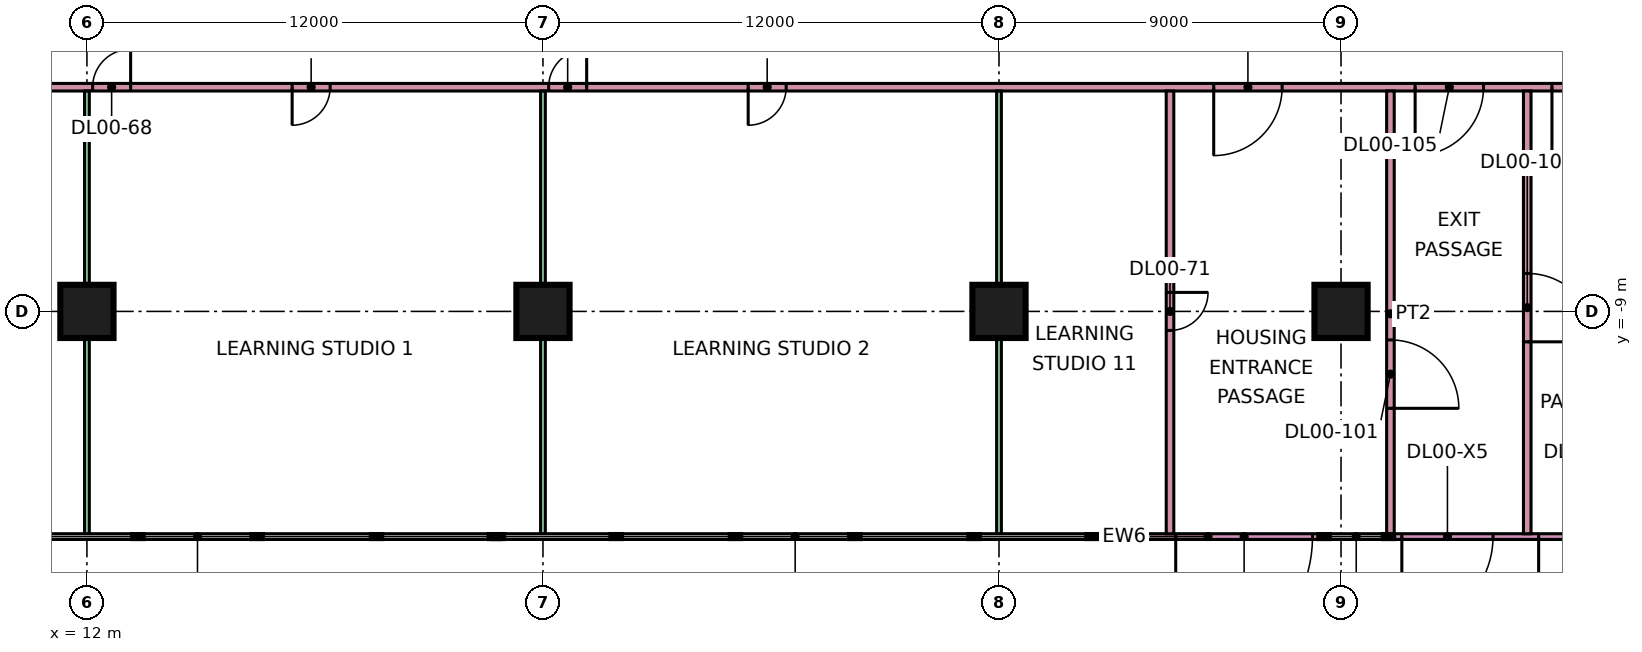
"""IFC4 building model, lengths in metres.
Left out: names, types, materials, properties, quantities, classifications, styles, units other than length and angle.
Written with IfcOpenShell. Run it as: python <this file> out.ifc"""

import sys

from ifc_helpers import new_model, si_unit, direction, frame, frame_2d, origin, origin_2d, place, context, subcontext, project, spatial, rectangle, extrude, element, fill, save


model = new_model("IFC4")
c1 = context("Model", 3, precision=1e-05, world=origin(), true_north=direction((0.0, 1.0)))
c2 = subcontext(c1, "Body", "Model", "MODEL_VIEW")
j1 = project(units=[si_unit("LENGTHUNIT", "METRE"), si_unit("PLANEANGLEUNIT", "RADIAN")], contexts=[c1])
p1 = place(None, origin())
s1 = spatial("IfcSite", under=j1, at=p1, CompositionType="ELEMENT")
p2 = place(p1, origin())
s2 = spatial("IfcBuilding", under=s1, at=p2, CompositionType="ELEMENT")
p3 = place(p2, origin())
s3 = spatial("IfcBuildingStorey", under=s2, at=p3, CompositionType="ELEMENT", Elevation=0.0)
for number, where, z_axis, x_axis in (
    (1, (12.0, -9.0, 0.0), (0.0, 0.0, 1.0), (1.0, 0.0, 0.0)),
    (2, (24.0, -9.0, 0.0), (0.0, 0.0, 1.0), (1.0, 0.0, 0.0)),
    (3, (36.0, -9.0, 0.0), (0.0, 0.0, 1.0), (1.0, 0.0, 0.0)),
    (4, (45.0, -9.0, 0.0), (0.0, 0.0, 1.0), (1.0, 0.0, 0.0)),
):
    element("IfcColumn", number, at=place(p3, frame(where, z_axis=z_axis, x_axis=x_axis)), inside=s3, PredefinedType="COLUMN", context=c2, shape_type="SweptSolid", body=[
        extrude(rectangle(XDim=1.4, YDim=1.4, at=origin_2d()), origin(), (0.0, 0.0, 1.0), 7.2),
    ])
p4 = place(p3, frame((38.5, -14.925, 0.0), z_axis=(0.0, 0.0, 1.0), x_axis=(1.0, 0.0, 0.0)))
e5 = element("IfcWall", 5, at=p4, inside=s3, PredefinedType="SOLIDWALL", context=c2, shape_type="SweptSolid", body=[
    extrude(rectangle(XDim=6.0, YDim=0.15, at=frame_2d((3.0, 0.0))), origin(), (0.0, 0.0, 1.0), 6.8),
])
p5 = place(p4, frame((2.15, 0.0, 0.0)))
e6 = element("IfcOpeningElement", 6, at=p5, cuts=e5, PredefinedType="OPENING", context=c2, shape_type="SweptSolid", body=[
    extrude(rectangle(XDim=3.6, YDim=2.8, at=frame_2d((1.8, 1.4))), frame((0.0, 0.085, 0.0), z_axis=(0.0, -1.0, 0.0), x_axis=(1.0, 0.0, 0.0)), (0.0, 0.0, 1.0), 0.17),
])
p6 = place(p3, frame((46.3, -14.925, 0.0), z_axis=(0.0, 0.0, 1.0), x_axis=(1.0, 0.0, 0.0)))
e7 = element("IfcWall", 7, at=p6, inside=s3, PredefinedType="SOLIDWALL", context=c2, shape_type="SweptSolid", body=[
    extrude(rectangle(XDim=6.6, YDim=0.15, at=frame_2d((3.3, 0.0))), origin(), (0.0, 0.0, 1.0), 6.8),
])
p7 = place(p6, frame((0.3, 0.0, 0.0)))
e8 = element("IfcOpeningElement", 8, at=p7, cuts=e7, PredefinedType="OPENING", context=c2, shape_type="SweptSolid", body=[
    extrude(rectangle(XDim=2.4, YDim=2.4, at=frame_2d((1.2, 1.2))), frame((0.0, 0.085, 0.0), z_axis=(0.0, -1.0, 0.0), x_axis=(1.0, 0.0, 0.0)), (0.0, 0.0, 1.0), 0.17),
])
p8 = place(p6, frame((3.9, 0.0, 0.0)))
e9 = element("IfcOpeningElement", 9, at=p8, cuts=e7, PredefinedType="OPENING", context=c2, shape_type="SweptSolid", body=[
    extrude(rectangle(XDim=2.4, YDim=2.4, at=frame_2d((1.2, 1.2))), frame((0.0, 0.085, 0.0), z_axis=(0.0, -1.0, 0.0), x_axis=(1.0, 0.0, 0.0)), (0.0, 0.0, 1.0), 0.17),
])
p9 = place(p3, frame((-3.2, -3.1, 0.0), z_axis=(0.0, 0.0, 1.0), x_axis=(1.0, 0.0, 0.0)))
e10 = element("IfcWall", 10, at=p9, inside=s3, PredefinedType="PARTITIONING", context=c2, shape_type="SweptSolid", body=[
    extrude(rectangle(XDim=78.3, YDim=0.2, at=frame_2d((39.15, 0.0))), origin(), (0.0, 0.0, 1.0), 6.8),
])
p10 = place(p9, frame((70.1, 0.0, 0.0)))
e11 = element("IfcOpeningElement", 11, at=p10, cuts=e10, PredefinedType="OPENING", context=c2, shape_type="SweptSolid", body=[
    extrude(rectangle(XDim=1.0, YDim=2.1, at=frame_2d((0.5, 1.05))), frame((0.0, 0.11, 0.0), z_axis=(0.0, -1.0, 0.0), x_axis=(1.0, 0.0, 0.0)), (0.0, 0.0, 1.0), 0.22),
])
p11 = place(p9, frame((66.35, 0.0, 0.0)))
e12 = element("IfcOpeningElement", 12, at=p11, cuts=e10, PredefinedType="OPENING", context=c2, shape_type="SweptSolid", body=[
    extrude(rectangle(XDim=1.0, YDim=2.1, at=frame_2d((0.5, 1.05))), frame((0.0, 0.11, 0.0), z_axis=(0.0, -1.0, 0.0), x_axis=(1.0, 0.0, 0.0)), (0.0, 0.0, 1.0), 0.22),
])
p12 = place(p9, frame((76.35, 0.0, 0.0)))
e13 = element("IfcOpeningElement", 13, at=p12, cuts=e10, PredefinedType="OPENING", context=c2, shape_type="SweptSolid", body=[
    extrude(rectangle(XDim=1.0, YDim=2.1, at=frame_2d((0.5, 1.05))), frame((0.0, 0.11, 0.0), z_axis=(0.0, -1.0, 0.0), x_axis=(1.0, 0.0, 0.0)), (0.0, 0.0, 1.0), 0.22),
])
p13 = place(p9, frame((8.6, 0.0, 0.0)))
e14 = element("IfcOpeningElement", 14, at=p13, cuts=e10, PredefinedType="OPENING", context=c2, shape_type="SweptSolid", body=[
    extrude(rectangle(XDim=1.0, YDim=2.1, at=frame_2d((0.5, 1.05))), frame((0.0, 0.11, 0.0), z_axis=(0.0, -1.0, 0.0), x_axis=(1.0, 0.0, 0.0)), (0.0, 0.0, 1.0), 0.22),
])
p14 = place(p9, frame((3.35, 0.0, 0.0)))
e15 = element("IfcOpeningElement", 15, at=p14, cuts=e10, PredefinedType="OPENING", context=c2, shape_type="SweptSolid", body=[
    extrude(rectangle(XDim=1.0, YDim=2.1, at=frame_2d((0.5, 1.05))), frame((0.0, 0.11, 0.0), z_axis=(0.0, -1.0, 0.0), x_axis=(1.0, 0.0, 0.0)), (0.0, 0.0, 1.0), 0.22),
])
p15 = place(p9, frame((20.6, 0.0, 0.0)))
e16 = element("IfcOpeningElement", 16, at=p15, cuts=e10, PredefinedType="OPENING", context=c2, shape_type="SweptSolid", body=[
    extrude(rectangle(XDim=1.0, YDim=2.1, at=frame_2d((0.5, 1.05))), frame((0.0, 0.11, 0.0), z_axis=(0.0, -1.0, 0.0), x_axis=(1.0, 0.0, 0.0)), (0.0, 0.0, 1.0), 0.22),
])
p16 = place(p9, frame((15.35, 0.0, 0.0)))
e17 = element("IfcOpeningElement", 17, at=p16, cuts=e10, PredefinedType="OPENING", context=c2, shape_type="SweptSolid", body=[
    extrude(rectangle(XDim=1.0, YDim=2.1, at=frame_2d((0.5, 1.05))), frame((0.0, 0.11, 0.0), z_axis=(0.0, -1.0, 0.0), x_axis=(1.0, 0.0, 0.0)), (0.0, 0.0, 1.0), 0.22),
])
p17 = place(p9, frame((32.6, 0.0, 0.0)))
e18 = element("IfcOpeningElement", 18, at=p17, cuts=e10, PredefinedType="OPENING", context=c2, shape_type="SweptSolid", body=[
    extrude(rectangle(XDim=1.0, YDim=2.1, at=frame_2d((0.5, 1.05))), frame((0.0, 0.11, 0.0), z_axis=(0.0, -1.0, 0.0), x_axis=(1.0, 0.0, 0.0)), (0.0, 0.0, 1.0), 0.22),
])
p18 = place(p9, frame((27.35, 0.0, 0.0)))
e19 = element("IfcOpeningElement", 19, at=p18, cuts=e10, PredefinedType="OPENING", context=c2, shape_type="SweptSolid", body=[
    extrude(rectangle(XDim=1.0, YDim=2.1, at=frame_2d((0.5, 1.05))), frame((0.0, 0.11, 0.0), z_axis=(0.0, -1.0, 0.0), x_axis=(1.0, 0.0, 0.0)), (0.0, 0.0, 1.0), 0.22),
])
p19 = place(p9, frame((44.85, 0.0, 0.0)))
e20 = element("IfcOpeningElement", 20, at=p19, cuts=e10, PredefinedType="OPENING", context=c2, shape_type="SweptSolid", body=[
    extrude(rectangle(XDim=1.8, YDim=2.1, at=frame_2d((0.9, 1.05))), frame((0.0, 0.11, 0.0), z_axis=(0.0, -1.0, 0.0), x_axis=(1.0, 0.0, 0.0)), (0.0, 0.0, 1.0), 0.22),
])
p20 = place(p9, frame((50.15, 0.0, 0.0)))
e21 = element("IfcOpeningElement", 21, at=p20, cuts=e10, PredefinedType="OPENING", context=c2, shape_type="SweptSolid", body=[
    extrude(rectangle(XDim=1.8, YDim=2.1, at=frame_2d((0.9, 1.05))), frame((0.0, 0.11, 0.0), z_axis=(0.0, -1.0, 0.0), x_axis=(1.0, 0.0, 0.0)), (0.0, 0.0, 1.0), 0.22),
])
p21 = place(p9, frame((53.75, 0.0, 0.0)))
e22 = element("IfcOpeningElement", 22, at=p21, cuts=e10, PredefinedType="OPENING", context=c2, shape_type="SweptSolid", body=[
    extrude(rectangle(XDim=1.8, YDim=2.1, at=frame_2d((0.9, 1.05))), frame((0.0, 0.11, 0.0), z_axis=(0.0, -1.0, 0.0), x_axis=(1.0, 0.0, 0.0)), (0.0, 0.0, 1.0), 0.22),
])
for number, where, z_axis, x_axis in (
    (23, (12.0, -14.925, 0.0), (0.0, 0.0, 1.0), (0.0, 1.0, 0.0)),
    (24, (24.0, -14.925, 0.0), (0.0, 0.0, 1.0), (0.0, 1.0, 0.0)),
    (25, (36.0, -14.925, 0.0), (0.0, 0.0, 1.0), (0.0, 1.0, 0.0)),
):
    element("IfcWall", number, at=place(p3, frame(where, z_axis=z_axis, x_axis=x_axis)), inside=s3, PredefinedType="PARTITIONING", context=c2, shape_type="SweptSolid", body=[
        extrude(rectangle(XDim=11.725, YDim=0.125, at=frame_2d((5.863, 0.0))), origin(), (0.0, 0.0, 1.0), 6.8),
    ])
p22 = place(p3, frame((40.5, -14.851, 0.0), z_axis=(0.0, 0.0, 1.0), x_axis=(0.0, 1.0, 0.0)))
e26 = element("IfcWall", 26, at=p22, inside=s3, PredefinedType="PARTITIONING", context=c2, shape_type="SweptSolid", body=[
    extrude(rectangle(XDim=11.651, YDim=0.2, at=frame_2d((5.826, 0.0))), origin(), (0.0, 0.0, 1.0), 6.8),
])
p23 = place(p22, frame((5.351, 0.0, 0.0)))
e27 = element("IfcOpeningElement", 27, at=p23, cuts=e26, PredefinedType="OPENING", context=c2, shape_type="SweptSolid", body=[
    extrude(rectangle(XDim=1.0, YDim=2.1, at=frame_2d((0.5, 1.05))), frame((0.0, 0.11, 0.0), z_axis=(0.0, -1.0, 0.0), x_axis=(1.0, 0.0, 0.0)), (0.0, 0.0, 1.0), 0.22),
])
p24 = place(p3, frame((46.3, -14.925, 0.0), z_axis=(0.0, 0.0, 1.0), x_axis=(0.0, 1.0, 0.0)))
e28 = element("IfcWall", 28, at=p24, inside=s3, PredefinedType="PARTITIONING", context=c2, shape_type="SweptSolid", body=[
    extrude(rectangle(XDim=11.725, YDim=0.2, at=frame_2d((5.863, 0.0))), origin(), (0.0, 0.0, 1.0), 6.8),
])
p25 = place(p24, frame((3.375, 0.0, 0.0)))
e29 = element("IfcOpeningElement", 29, at=p25, cuts=e28, PredefinedType="OPENING", context=c2, shape_type="SweptSolid", body=[
    extrude(rectangle(XDim=1.8, YDim=2.1, at=frame_2d((0.9, 1.05))), frame((0.0, 0.11, 0.0), z_axis=(0.0, -1.0, 0.0), x_axis=(1.0, 0.0, 0.0)), (0.0, 0.0, 1.0), 0.22),
])
p26 = place(p3, frame((49.9, -14.851, 0.0), z_axis=(0.0, 0.0, 1.0), x_axis=(0.0, 1.0, 0.0)))
e30 = element("IfcWall", 30, at=p26, inside=s3, PredefinedType="PARTITIONING", context=c2, shape_type="SweptSolid", body=[
    extrude(rectangle(XDim=11.651, YDim=0.2, at=frame_2d((5.826, 0.0))), origin(), (0.0, 0.0, 1.0), 6.8),
])
p27 = place(p26, frame((5.051, 0.0, 0.0)))
e31 = element("IfcOpeningElement", 31, at=p27, cuts=e30, PredefinedType="OPENING", context=c2, shape_type="SweptSolid", body=[
    extrude(rectangle(XDim=1.8, YDim=2.1, at=frame_2d((0.9, 1.05))), frame((0.0, 0.11, 0.0), z_axis=(0.0, -1.0, 0.0), x_axis=(1.0, 0.0, 0.0)), (0.0, 0.0, 1.0), 0.22),
])
p28 = place(p5, frame((3.6, 0.0, 0.0), z_axis=(0.0, 0.0, 1.0), x_axis=(-1.0, 0.0, 0.0)))
e32 = element("IfcDoor", 32, at=p28, inside=s3, OperationType="DOUBLE_DOOR_SINGLE_SWING", PredefinedType="DOOR", context=c2, shape_type="SweptSolid", body=[
    extrude(rectangle(XDim=3.6, YDim=2.8, at=frame_2d((1.8, 1.4))), frame((0.0, 0.025, 0.0), z_axis=(0.0, -1.0, 0.0), x_axis=(1.0, 0.0, 0.0)), (0.0, 0.0, 1.0), 0.05),
])
fill(e6, e32)
p29 = place(p7, frame((2.4, 0.0, 0.0), z_axis=(0.0, 0.0, 1.0), x_axis=(-1.0, 0.0, 0.0)))
e33 = element("IfcDoor", 33, at=p29, inside=s3, OperationType="DOUBLE_DOOR_SINGLE_SWING", PredefinedType="DOOR", context=c2, shape_type="SweptSolid", body=[
    extrude(rectangle(XDim=2.4, YDim=2.4, at=frame_2d((1.2, 1.2))), frame((0.0, 0.025, 0.0), z_axis=(0.0, -1.0, 0.0), x_axis=(1.0, 0.0, 0.0)), (0.0, 0.0, 1.0), 0.05),
])
fill(e8, e33)
p30 = place(p8, frame((2.4, 0.0, 0.0), z_axis=(0.0, 0.0, 1.0), x_axis=(-1.0, 0.0, 0.0)))
e34 = element("IfcDoor", 34, at=p30, inside=s3, OperationType="DOUBLE_DOOR_SINGLE_SWING", PredefinedType="DOOR", context=c2, shape_type="SweptSolid", body=[
    extrude(rectangle(XDim=2.4, YDim=2.4, at=frame_2d((1.2, 1.2))), frame((0.0, 0.025, 0.0), z_axis=(0.0, -1.0, 0.0), x_axis=(1.0, 0.0, 0.0)), (0.0, 0.0, 1.0), 0.05),
])
fill(e9, e34)
p31 = place(p15, frame((1.0, 0.0, 0.0), z_axis=(0.0, 0.0, 1.0), x_axis=(-1.0, 0.0, 0.0)))
e35 = element("IfcDoor", 35, at=p31, inside=s3, OperationType="SINGLE_SWING_LEFT", PredefinedType="DOOR", context=c2, shape_type="SweptSolid", body=[
    extrude(rectangle(XDim=1.0, YDim=2.1, at=frame_2d((0.5, 1.05))), frame((0.0, 0.025, 0.0), z_axis=(0.0, -1.0, 0.0), x_axis=(1.0, 0.0, 0.0)), (0.0, 0.0, 1.0), 0.05),
])
fill(e16, e35)
p32 = place(p16, frame((1.0, 0.0, 0.0), z_axis=(0.0, 0.0, 1.0), x_axis=(-1.0, 0.0, 0.0)))
e36 = element("IfcDoor", 36, at=p32, inside=s3, OperationType="SINGLE_SWING_RIGHT", PredefinedType="DOOR", context=c2, shape_type="SweptSolid", body=[
    extrude(rectangle(XDim=1.0, YDim=2.1, at=frame_2d((0.5, 1.05))), frame((0.0, 0.025, 0.0), z_axis=(0.0, -1.0, 0.0), x_axis=(1.0, 0.0, 0.0)), (0.0, 0.0, 1.0), 0.05),
])
fill(e17, e36)
p33 = place(p17, frame((1.0, 0.0, 0.0), z_axis=(0.0, 0.0, 1.0), x_axis=(-1.0, 0.0, 0.0)))
e37 = element("IfcDoor", 37, at=p33, inside=s3, OperationType="SINGLE_SWING_LEFT", PredefinedType="DOOR", context=c2, shape_type="SweptSolid", body=[
    extrude(rectangle(XDim=1.0, YDim=2.1, at=frame_2d((0.5, 1.05))), frame((0.0, 0.025, 0.0), z_axis=(0.0, -1.0, 0.0), x_axis=(1.0, 0.0, 0.0)), (0.0, 0.0, 1.0), 0.05),
])
fill(e18, e37)
p34 = place(p18, frame((1.0, 0.0, 0.0), z_axis=(0.0, 0.0, 1.0), x_axis=(-1.0, 0.0, 0.0)))
e38 = element("IfcDoor", 38, at=p34, inside=s3, OperationType="SINGLE_SWING_RIGHT", PredefinedType="DOOR", context=c2, shape_type="SweptSolid", body=[
    extrude(rectangle(XDim=1.0, YDim=2.1, at=frame_2d((0.5, 1.05))), frame((0.0, 0.025, 0.0), z_axis=(0.0, -1.0, 0.0), x_axis=(1.0, 0.0, 0.0)), (0.0, 0.0, 1.0), 0.05),
])
fill(e19, e38)
p35 = place(p23, origin())
e39 = element("IfcDoor", 39, at=p35, inside=s3, OperationType="SINGLE_SWING_RIGHT", PredefinedType="DOOR", context=c2, shape_type="SweptSolid", body=[
    extrude(rectangle(XDim=1.0, YDim=2.1, at=frame_2d((0.5, 1.05))), frame((0.0, 0.025, 0.0), z_axis=(0.0, -1.0, 0.0), x_axis=(1.0, 0.0, 0.0)), (0.0, 0.0, 1.0), 0.05),
])
fill(e27, e39)
p36 = place(p25, frame((1.8, 0.0, 0.0), z_axis=(0.0, 0.0, 1.0), x_axis=(-1.0, 0.0, 0.0)))
e40 = element("IfcDoor", 40, at=p36, inside=s3, OperationType="DOUBLE_DOOR_SINGLE_SWING", PredefinedType="DOOR", context=c2, shape_type="SweptSolid", body=[
    extrude(rectangle(XDim=1.8, YDim=2.1, at=frame_2d((0.9, 1.05))), frame((0.0, 0.025, 0.0), z_axis=(0.0, -1.0, 0.0), x_axis=(1.0, 0.0, 0.0)), (0.0, 0.0, 1.0), 0.05),
])
fill(e29, e40)
p37 = place(p19, frame((1.8, 0.0, 0.0), z_axis=(0.0, 0.0, 1.0), x_axis=(-1.0, 0.0, 0.0)))
e41 = element("IfcDoor", 41, at=p37, inside=s3, OperationType="DOUBLE_DOOR_SINGLE_SWING", PredefinedType="DOOR", context=c2, shape_type="SweptSolid", body=[
    extrude(rectangle(XDim=1.8, YDim=2.1, at=frame_2d((0.9, 1.05))), frame((0.0, 0.025, 0.0), z_axis=(0.0, -1.0, 0.0), x_axis=(1.0, 0.0, 0.0)), (0.0, 0.0, 1.0), 0.05),
])
fill(e20, e41)
p38 = place(p27, frame((1.8, 0.0, 0.0), z_axis=(0.0, 0.0, 1.0), x_axis=(-1.0, 0.0, 0.0)))
e42 = element("IfcDoor", 42, at=p38, inside=s3, OperationType="DOUBLE_DOOR_SINGLE_SWING", PredefinedType="DOOR", context=c2, shape_type="SweptSolid", body=[
    extrude(rectangle(XDim=1.8, YDim=2.1, at=frame_2d((0.9, 1.05))), frame((0.0, 0.025, 0.0), z_axis=(0.0, -1.0, 0.0), x_axis=(1.0, 0.0, 0.0)), (0.0, 0.0, 1.0), 0.05),
])
fill(e31, e42)
p39 = place(p20, frame((1.8, 0.0, 0.0), z_axis=(0.0, 0.0, 1.0), x_axis=(-1.0, 0.0, 0.0)))
e43 = element("IfcDoor", 43, at=p39, inside=s3, OperationType="DOUBLE_DOOR_SINGLE_SWING", PredefinedType="DOOR", context=c2, shape_type="SweptSolid", body=[
    extrude(rectangle(XDim=1.8, YDim=2.1, at=frame_2d((0.9, 1.05))), frame((0.0, 0.025, 0.0), z_axis=(0.0, -1.0, 0.0), x_axis=(1.0, 0.0, 0.0)), (0.0, 0.0, 1.0), 0.05),
])
fill(e21, e43)
p40 = place(p21, frame((1.8, 0.0, 0.0), z_axis=(0.0, 0.0, 1.0), x_axis=(-1.0, 0.0, 0.0)))
e44 = element("IfcDoor", 44, at=p40, inside=s3, OperationType="DOUBLE_DOOR_SINGLE_SWING", PredefinedType="DOOR", context=c2, shape_type="SweptSolid", body=[
    extrude(rectangle(XDim=1.8, YDim=2.1, at=frame_2d((0.9, 1.05))), frame((0.0, 0.025, 0.0), z_axis=(0.0, -1.0, 0.0), x_axis=(1.0, 0.0, 0.0)), (0.0, 0.0, 1.0), 0.05),
])
fill(e22, e44)
save(model, sys.argv[1])
